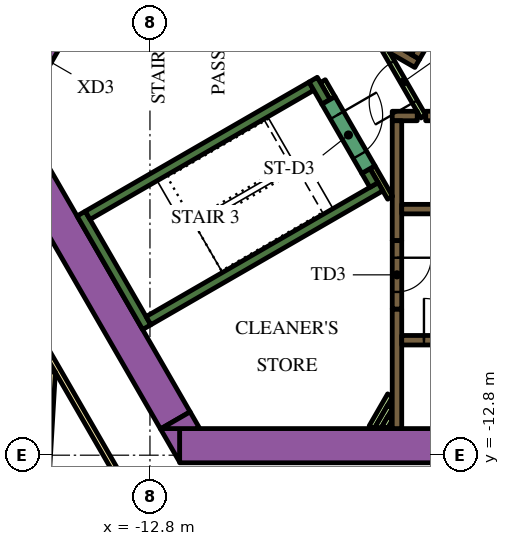
"""IFC4 building model, lengths in metres.
Left out: names, types, materials, properties, quantities, classifications, styles, units other than length and angle.
Written with IfcOpenShell. Run it as: python <this file> out.ifc"""

import sys

from ifc_helpers import new_model, si_unit, direction, frame, frame_2d, origin, place, context, subcontext, project, spatial, polyline, rectangle, outline, extrude, element, fill, save


model = new_model("IFC4")
c1 = context("Model", 3, precision=1e-05, world=origin(), true_north=direction((0.0, 1.0)))
c2 = subcontext(c1, "Body", "Model", "MODEL_VIEW")
j1 = project(units=[si_unit("LENGTHUNIT", "METRE"), si_unit("PLANEANGLEUNIT", "RADIAN")], contexts=[c1])
p1 = place(None, origin())
s1 = spatial("IfcSite", under=j1, at=p1, CompositionType="ELEMENT")
p2 = place(p1, origin())
s2 = spatial("IfcBuilding", under=s1, at=p2, CompositionType="ELEMENT")
p3 = place(p2, frame((0.0, 0.0, 111.0)))
s3 = spatial("IfcBuildingStorey", under=s2, at=p3, CompositionType="ELEMENT", Elevation=111.0)
p4 = place(p3, frame((-12.019, -12.55, 0.0), z_axis=(0.0, 0.0, 1.0), x_axis=(1.0, 0.0, 0.0)))
e1 = element("IfcWall", 1, at=p4, inside=s3, PredefinedType="SOLIDWALL", context=c2, shape_type="SweptSolid", body=[
    extrude(rectangle(XDim=21.63, YDim=0.9, at=frame_2d((10.815, 0.0))), origin(), (0.0, 0.0, 1.0), 3.9),
])
p5 = place(p3, origin())
e2 = element("IfcWall", 2, at=p5, inside=s3, PredefinedType="SOLIDWALL", context=c2, shape_type="SweptSolid", body=[
    extrude(outline(polyline([(-12.529, -12.1), (-12.021, -12.1), (-12.021, -12.98), (-12.529, -12.1)])), origin(), (0.0, 0.0, 1.0), 3.9),
])
p6 = place(p3, frame((-12.134, -11.883, 0.0), z_axis=(0.0, 0.0, 1.0), x_axis=(-0.500005339912, 0.866022320763, 0.0)))
e3 = element("IfcWall", 3, at=p6, inside=s3, PredefinedType="SOLIDWALL", context=c2, shape_type="SweptSolid", body=[
    extrude(rectangle(XDim=9.488, YDim=0.9, at=frame_2d((4.744, 0.0))), origin(), (0.0, 0.0, 1.0), 3.9),
])
e4 = element("IfcWall", 4, at=p5, inside=s3, PredefinedType="SOLIDWALL", context=c2, shape_type="SweptSolid", body=[
    extrude(outline(polyline([(-11.489, -12.1), (-12.505, -12.1), (-11.743, -11.66), (-11.489, -12.1)])), origin(), (0.0, 0.0, 1.0), 3.9),
])
p7 = place(p3, frame((-12.885, -9.431, 0.0), z_axis=(0.0, 0.0, 1.0), x_axis=(-0.500020560727, 0.866013532718, 0.0)))
e5 = element("IfcWall", 5, at=p7, inside=s3, PredefinedType="SOLIDWALL", context=c2, shape_type="SweptSolid", body=[
    extrude(rectangle(XDim=3.45, YDim=0.25, at=frame_2d((1.725, 0.0))), origin(), (0.0, 0.0, 1.0), 3.9),
])
p8 = place(p3, frame((-14.44, -6.49, 0.0), z_axis=(0.0, 0.0, 1.0), x_axis=(0.866022966069, 0.500004222222, 0.0)))
e6 = element("IfcWall", 6, at=p8, inside=s3, PredefinedType="SOLIDWALL", context=c2, shape_type="SweptSolid", body=[
    extrude(rectangle(XDim=6.8, YDim=0.25, at=frame_2d((3.4, 0.0))), origin(), (0.0, 0.0, 1.0), 3.9),
])
p9 = place(p3, frame((-8.168, -3.503, 0.0), z_axis=(0.0, 0.0, 1.0), x_axis=(-0.499952099219, 0.866053057547, 0.0)))
e7 = element("IfcWall", 7, at=p9, inside=s3, PredefinedType="SOLIDWALL", context=c2, shape_type="SweptSolid", body=[
    extrude(rectangle(XDim=0.675, YDim=0.25, at=frame_2d((0.337, 0.0))), origin(), (0.0, 0.0, 1.0), 3.9),
])
p10 = place(p3, frame((-12.84, -9.261, 0.0), z_axis=(0.0, 0.0, 1.0), x_axis=(0.866016039709, 0.500016218704, 0.0)))
e8 = element("IfcWall", 8, at=p10, inside=s3, PredefinedType="SOLIDWALL", context=c2, shape_type="SweptSolid", body=[
    extrude(rectangle(XDim=7.05, YDim=0.25, at=frame_2d((3.525, 0.0))), origin(), (0.0, 0.0, 1.0), 3.9),
])
p11 = place(p3, frame((-6.905, -5.69, 0.0), z_axis=(0.0, 0.0, 1.0), x_axis=(-0.500402024738, 0.865793170242, 0.0)))
e9 = element("IfcWall", 9, at=p11, inside=s3, PredefinedType="SOLIDWALL", context=c2, shape_type="SweptSolid", body=[
    extrude(rectangle(XDim=0.425, YDim=0.25, at=frame_2d((0.212, 0.0))), origin(), (0.0, 0.0, 1.0), 3.9),
])
p12 = place(p3, frame((-6.3, -12.1, 0.0), z_axis=(0.0, 0.0, 1.0), x_axis=(0.0, 1.0, 0.0)))
e10 = element("IfcWall", 10, at=p12, inside=s3, PredefinedType="SOLIDWALL", context=c2, shape_type="SweptSolid", body=[
    extrude(rectangle(XDim=3.146, YDim=0.25, at=frame_2d((1.573, 0.0))), origin(), (0.0, 0.0, 1.0), 3.9),
])
p13 = place(p3, frame((-5.545, -3.875, 0.0), z_axis=(0.0, 0.0, 1.0), x_axis=(1.0, 0.0, 0.0)))
e11 = element("IfcWall", 11, at=p13, inside=s3, PredefinedType="SOLIDWALL", context=c2, shape_type="SweptSolid", body=[
    extrude(rectangle(XDim=11.97, YDim=0.25, at=frame_2d((5.985, 0.0))), origin(), (0.0, 0.0, 1.0), 3.9),
])
p14 = place(p3, frame((-6.425, -3.875, 0.0), z_axis=(0.0, 0.0, 1.0), x_axis=(1.0, 0.0, 0.0)))
e12 = element("IfcWall", 12, at=p14, inside=s3, PredefinedType="SOLIDWALL", context=c2, shape_type="SweptSolid", body=[
    extrude(rectangle(XDim=0.658, YDim=0.25, at=frame_2d((0.329, 0.0))), origin(), (0.0, 0.0, 1.0), 3.9),
])
p15 = place(p3, frame((-6.3, -4.0, 0.0), z_axis=(0.0, 0.0, 1.0), x_axis=(0.0, -1.0, 0.0)))
e13 = element("IfcWall", 13, at=p15, inside=s3, PredefinedType="SOLIDWALL", context=c2, shape_type="SweptSolid", body=[
    extrude(rectangle(XDim=3.154, YDim=0.25, at=frame_2d((1.577, 0.0))), origin(), (0.0, 0.0, 1.0), 3.9),
])
e14 = element("IfcWall", 14, at=p5, inside=s3, PredefinedType="SOLIDWALL", context=c2, shape_type="SweptSolid", body=[
    extrude(outline(polyline([(-5.922, -2.257), (-5.922, -2.257), (-5.705, -2.382), (-5.83, -2.598), (-6.483, -2.221), (-6.591, -2.033), (-6.591, -2.033), (-6.7, -2.096), (-7.952, -1.373), (-7.827, -1.156), (-5.922, -2.257)])), origin(), (0.0, 0.0, 1.0), 3.9),
])
p16 = place(p3, frame((-6.968, -12.068, 0.0), z_axis=(0.0, 0.0, 1.0), x_axis=(0.49998975084, 0.866031321059, 0.0)))
e15 = element("IfcWall", 15, at=p16, inside=s3, PredefinedType="PARTITIONING", context=c2, shape_type="SweptSolid", body=[
    extrude(rectangle(XDim=0.975, YDim=0.15, at=frame_2d((0.488, 0.0))), origin(), (0.0, 0.0, 1.0), 2.75),
])
p17 = place(p3, frame((-6.794, -12.068, 0.0), z_axis=(0.0, 0.0, 1.0), x_axis=(0.49985693963, 0.866107983974, 0.0)))
e16 = element("IfcWall", 16, at=p17, inside=s3, PredefinedType="PARTITIONING", context=c2, shape_type="SweptSolid", body=[
    extrude(rectangle(XDim=0.629, YDim=0.15, at=frame_2d((0.314, 0.0))), origin(), (0.0, 0.0, 1.0), 2.75),
])
p18 = place(p3, frame((-6.621, -12.068, 0.0), z_axis=(0.0, 0.0, 1.0), x_axis=(0.500046963369, 0.865998287773, 0.0)))
e17 = element("IfcWall", 17, at=p18, inside=s3, PredefinedType="PARTITIONING", context=c2, shape_type="SweptSolid", body=[
    extrude(rectangle(XDim=0.282, YDim=0.15, at=frame_2d((0.141, 0.0))), origin(), (0.0, 0.0, 1.0), 2.75),
])
p19 = place(p3, frame((-6.48, -6.027, 0.0), z_axis=(0.0, 0.0, 1.0), x_axis=(-0.499927229454, 0.866067413802, 0.0)))
e18 = element("IfcWall", 18, at=p19, inside=s3, PredefinedType="PARTITIONING", context=c2, shape_type="SweptSolid", body=[
    extrude(rectangle(XDim=0.929, YDim=0.15, at=frame_2d((0.464, 0.0))), origin(), (0.0, 0.0, 1.0), 3.9),
])
p20 = place(p3, frame((-8.252, -2.958, 0.0), z_axis=(0.0, 0.0, 1.0), x_axis=(0.500174715838, -0.865924508047, 0.0)))
e19 = element("IfcWall", 19, at=p20, inside=s3, PredefinedType="PARTITIONING", context=c2, shape_type="SweptSolid", body=[
    extrude(rectangle(XDim=0.514, YDim=0.15, at=frame_2d((0.257, 0.0))), origin(), (0.0, 0.0, 1.0), 2.75),
])
p21 = place(p3, frame((-6.175, -9.775, 0.0), z_axis=(0.0, 0.0, 1.0), x_axis=(1.0, 0.0, 0.0)))
e20 = element("IfcWall", 20, at=p21, inside=s3, PredefinedType="SOLIDWALL", context=c2, shape_type="SweptSolid", body=[
    extrude(rectangle(XDim=12.35, YDim=0.25, at=frame_2d((6.175, 0.0))), origin(), (0.0, 0.0, 1.0), 3.9),
])
p22 = place(p21, frame((0.585, 0.0, 0.0)))
e21 = element("IfcOpeningElement", 21, at=p22, cuts=e20, PredefinedType="OPENING", context=c2, shape_type="SweptSolid", body=[
    extrude(rectangle(XDim=1.1, YDim=2.1, at=frame_2d((0.55, 1.05))), frame((0.0, 0.135, 0.0), z_axis=(0.0, -1.0, 0.0), x_axis=(1.0, 0.0, 0.0)), (0.0, 0.0, 1.0), 0.27),
])
p23 = place(p21, frame((3.105, 0.0, 0.0)))
e22 = element("IfcOpeningElement", 22, at=p23, cuts=e20, PredefinedType="OPENING", context=c2, shape_type="SweptSolid", body=[
    extrude(rectangle(XDim=1.1, YDim=2.1, at=frame_2d((0.55, 1.05))), frame((0.0, 0.135, 0.0), z_axis=(0.0, -1.0, 0.0), x_axis=(1.0, 0.0, 0.0)), (0.0, 0.0, 1.0), 0.27),
])
p24 = place(p21, frame((5.625, 0.0, 0.0)))
e23 = element("IfcOpeningElement", 23, at=p24, cuts=e20, PredefinedType="OPENING", context=c2, shape_type="SweptSolid", body=[
    extrude(rectangle(XDim=1.1, YDim=2.1, at=frame_2d((0.55, 1.05))), frame((0.0, 0.135, 0.0), z_axis=(0.0, -1.0, 0.0), x_axis=(1.0, 0.0, 0.0)), (0.0, 0.0, 1.0), 0.27),
])
p25 = place(p21, frame((8.145, 0.0, 0.0)))
e24 = element("IfcOpeningElement", 24, at=p25, cuts=e20, PredefinedType="OPENING", context=c2, shape_type="SweptSolid", body=[
    extrude(rectangle(XDim=1.1, YDim=2.1, at=frame_2d((0.55, 1.05))), frame((0.0, 0.135, 0.0), z_axis=(0.0, -1.0, 0.0), x_axis=(1.0, 0.0, 0.0)), (0.0, 0.0, 1.0), 0.27),
])
p26 = place(p21, frame((10.665, 0.0, 0.0)))
e25 = element("IfcOpeningElement", 25, at=p26, cuts=e20, PredefinedType="OPENING", context=c2, shape_type="SweptSolid", body=[
    extrude(rectangle(XDim=1.1, YDim=2.1, at=frame_2d((0.55, 1.05))), frame((0.0, 0.135, 0.0), z_axis=(0.0, -1.0, 0.0), x_axis=(1.0, 0.0, 0.0)), (0.0, 0.0, 1.0), 0.27),
])
p27 = place(p3, frame((-6.175, -6.325, 0.0), z_axis=(0.0, 0.0, 1.0), x_axis=(1.0, 0.0, 0.0)))
e26 = element("IfcWall", 26, at=p27, inside=s3, PredefinedType="SOLIDWALL", context=c2, shape_type="SweptSolid", body=[
    extrude(rectangle(XDim=12.35, YDim=0.25, at=frame_2d((6.175, 0.0))), origin(), (0.0, 0.0, 1.0), 3.9),
])
p28 = place(p27, frame((3.205, 0.0, 0.0)))
e27 = element("IfcOpeningElement", 27, at=p28, cuts=e26, PredefinedType="OPENING", context=c2, shape_type="SweptSolid", body=[
    extrude(rectangle(XDim=0.9, YDim=2.1, at=frame_2d((0.45, 1.05))), frame((0.0, 0.135, 0.0), z_axis=(0.0, -1.0, 0.0), x_axis=(1.0, 0.0, 0.0)), (0.0, 0.0, 1.0), 0.27),
])
p29 = place(p27, frame((8.145, 0.0, 0.0)))
e28 = element("IfcOpeningElement", 28, at=p29, cuts=e26, PredefinedType="OPENING", context=c2, shape_type="SweptSolid", body=[
    extrude(rectangle(XDim=1.1, YDim=2.1, at=frame_2d((0.55, 1.05))), frame((0.0, 0.135, 0.0), z_axis=(0.0, -1.0, 0.0), x_axis=(1.0, 0.0, 0.0)), (0.0, 0.0, 1.0), 0.27),
])
p30 = place(p27, frame((10.665, 0.0, 0.0)))
e29 = element("IfcOpeningElement", 29, at=p30, cuts=e26, PredefinedType="OPENING", context=c2, shape_type="SweptSolid", body=[
    extrude(rectangle(XDim=1.1, YDim=2.1, at=frame_2d((0.55, 1.05))), frame((0.0, 0.135, 0.0), z_axis=(0.0, -1.0, 0.0), x_axis=(1.0, 0.0, 0.0)), (0.0, 0.0, 1.0), 0.27),
])
p31 = place(p3, frame((-0.898, 6.194, 0.0), z_axis=(0.0, 0.0, 1.0), x_axis=(-0.499996202215, -0.866027596426, 0.0)))
e30 = element("IfcWall", 30, at=p31, inside=s3, PredefinedType="SOLIDWALL", context=c2, shape_type="SweptSolid", body=[
    extrude(rectangle(XDim=9.83, YDim=0.25, at=frame_2d((4.915, 0.0))), origin(), (0.0, 0.0, 1.0), 3.9),
])
p32 = place(p31, frame((0.585, 0.0, 0.0)))
e31 = element("IfcOpeningElement", 31, at=p32, cuts=e30, PredefinedType="OPENING", context=c2, shape_type="SweptSolid", body=[
    extrude(rectangle(XDim=1.1, YDim=2.1, at=frame_2d((0.55, 1.05))), frame((0.0, 0.135, 0.0), z_axis=(0.0, -1.0, 0.0), x_axis=(1.0, 0.0, 0.0)), (0.0, 0.0, 1.0), 0.27),
])
p33 = place(p31, frame((3.105, 0.0, 0.0)))
e32 = element("IfcOpeningElement", 32, at=p33, cuts=e30, PredefinedType="OPENING", context=c2, shape_type="SweptSolid", body=[
    extrude(rectangle(XDim=1.1, YDim=2.1, at=frame_2d((0.55, 1.05))), frame((0.0, 0.135, 0.0), z_axis=(0.0, -1.0, 0.0), x_axis=(1.0, 0.0, 0.0)), (0.0, 0.0, 1.0), 0.27),
])
p34 = place(p31, frame((5.625, 0.0, 0.0)))
e33 = element("IfcOpeningElement", 33, at=p34, cuts=e30, PredefinedType="OPENING", context=c2, shape_type="SweptSolid", body=[
    extrude(rectangle(XDim=1.1, YDim=2.1, at=frame_2d((0.55, 1.05))), frame((0.0, 0.135, 0.0), z_axis=(0.0, -1.0, 0.0), x_axis=(1.0, 0.0, 0.0)), (0.0, 0.0, 1.0), 0.27),
])
p35 = place(p31, frame((8.145, 0.0, 0.0)))
e34 = element("IfcOpeningElement", 34, at=p35, cuts=e30, PredefinedType="OPENING", context=c2, shape_type="SweptSolid", body=[
    extrude(rectangle(XDim=1.1, YDim=2.1, at=frame_2d((0.55, 1.05))), frame((0.0, 0.135, 0.0), z_axis=(0.0, -1.0, 0.0), x_axis=(1.0, 0.0, 0.0)), (0.0, 0.0, 1.0), 0.27),
])
p36 = place(p3, frame((-8.103, -3.466, 0.0), z_axis=(0.0, 0.0, 1.0), x_axis=(0.500078061341, -0.865980330357, 0.0)))
e35 = element("IfcWall", 35, at=p36, inside=s3, PredefinedType="SOLIDWALL", context=c2, shape_type="SweptSolid", body=[
    extrude(rectangle(XDim=2.1, YDim=0.4, at=frame_2d((1.05, 0.0))), origin(), (0.0, 0.0, 1.0), 3.9),
])
p37 = place(p36, frame((0.45, 0.0, 0.0)))
e36 = element("IfcOpeningElement", 36, at=p37, cuts=e35, PredefinedType="OPENING", context=c2, shape_type="SweptSolid", body=[
    extrude(rectangle(XDim=1.2, YDim=2.1, at=frame_2d((0.6, 1.05))), frame((0.0, 0.21, 0.0), z_axis=(0.0, -1.0, 0.0), x_axis=(1.0, 0.0, 0.0)), (0.0, 0.0, 1.0), 0.42),
])
p38 = place(p3, frame((-6.3, -7.154, 0.0), z_axis=(0.0, 0.0, 1.0), x_axis=(0.0, -1.0, 0.0)))
e37 = element("IfcWall", 37, at=p38, inside=s3, PredefinedType="SOLIDWALL", context=c2, shape_type="SweptSolid", body=[
    extrude(rectangle(XDim=1.8, YDim=0.25, at=frame_2d((0.9, 0.0))), origin(), (0.0, 0.0, 1.0), 3.9),
])
p39 = place(p38, frame((0.45, 0.0, 0.0)))
e38 = element("IfcOpeningElement", 38, at=p39, cuts=e37, PredefinedType="OPENING", context=c2, shape_type="SweptSolid", body=[
    extrude(rectangle(XDim=0.9, YDim=2.1, at=frame_2d((0.45, 1.05))), frame((0.0, 0.135, 0.0), z_axis=(0.0, -1.0, 0.0), x_axis=(1.0, 0.0, 0.0)), (0.0, 0.0, 1.0), 0.27),
])
p40 = place(p3, frame((-5.606, -3.89, 0.0), z_axis=(0.0, 0.0, 1.0), x_axis=(-0.500027713859, 0.866009402589, 0.0)))
e39 = element("IfcWall", 39, at=p40, inside=s3, PredefinedType="PARTITIONING", context=c2, shape_type="SweptSolid", body=[
    extrude(rectangle(XDim=2.1, YDim=0.15, at=frame_2d((1.05, 0.0))), origin(), (0.0, 0.0, 1.0), 2.75),
])
p41 = place(p40, frame((0.45, 0.0, 0.0)))
e40 = element("IfcOpeningElement", 40, at=p41, cuts=e39, PredefinedType="OPENING", context=c2, shape_type="SweptSolid", body=[
    extrude(rectangle(XDim=1.2, YDim=2.1, at=frame_2d((0.6, 1.05))), frame((0.0, 0.085, 0.0), z_axis=(0.0, -1.0, 0.0), x_axis=(1.0, 0.0, 0.0)), (0.0, 0.0, 1.0), 0.17),
])
p42 = place(p3, frame((-16.209, -2.976, 0.0), z_axis=(0.0, 0.0, 1.0), x_axis=(0.499954529098, 0.86605165483, 0.0)))
e41 = element("IfcWall", 41, at=p42, inside=s3, PredefinedType="SOLIDWALL", context=c2, shape_type="SweptSolid", body=[
    extrude(rectangle(XDim=1.7, YDim=0.9, at=frame_2d((0.85, 0.0))), origin(), (0.0, 0.0, 1.0), 3.9),
])
p43 = place(p42, frame((0.25, 0.0, 0.0)))
e42 = element("IfcOpeningElement", 42, at=p43, cuts=e41, PredefinedType="OPENING", context=c2, shape_type="SweptSolid", body=[
    extrude(rectangle(XDim=1.2, YDim=2.1, at=frame_2d((0.6, 1.05))), frame((0.0, 0.46, 0.0), z_axis=(0.0, -1.0, 0.0), x_axis=(1.0, 0.0, 0.0)), (0.0, 0.0, 1.0), 0.92),
])
p44 = place(p3, frame((-19.081, -3.9, 0.0), z_axis=(0.0, 0.0, 1.0), x_axis=(0.499998313975, 0.866026377209, 0.0)))
e43 = element("IfcWall", 43, at=p44, inside=s3, PredefinedType="PARTITIONING", context=c2, shape_type="SweptSolid", body=[
    extrude(rectangle(XDim=25.766, YDim=0.15, at=frame_2d((12.883, 0.0))), origin(), (0.0, 0.0, 1.0), 2.75),
])
p45 = place(p44, frame((19.306, 0.0, 0.0)))
e44 = element("IfcOpeningElement", 44, at=p45, cuts=e43, PredefinedType="OPENING", context=c2, shape_type="SweptSolid", body=[
    extrude(rectangle(XDim=1.0, YDim=2.1, at=frame_2d((0.5, 1.05))), frame((0.0, 0.085, 0.0), z_axis=(0.0, -1.0, 0.0), x_axis=(1.0, 0.0, 0.0)), (0.0, 0.0, 1.0), 0.17),
])
p46 = place(p44, frame((18.0, 0.0, 0.0)))
e45 = element("IfcOpeningElement", 45, at=p46, cuts=e43, PredefinedType="OPENING", context=c2, shape_type="SweptSolid", body=[
    extrude(rectangle(XDim=1.0, YDim=2.1, at=frame_2d((0.5, 1.05))), frame((0.0, 0.085, 0.0), z_axis=(0.0, -1.0, 0.0), x_axis=(1.0, 0.0, 0.0)), (0.0, 0.0, 1.0), 0.17),
])
p47 = place(p44, frame((6.838, 0.0, 0.0)))
e46 = element("IfcOpeningElement", 46, at=p47, cuts=e43, PredefinedType="OPENING", context=c2, shape_type="SweptSolid", body=[
    extrude(rectangle(XDim=1.0, YDim=2.1, at=frame_2d((0.5, 1.05))), frame((0.0, 0.085, 0.0), z_axis=(0.0, -1.0, 0.0), x_axis=(1.0, 0.0, 0.0)), (0.0, 0.0, 1.0), 0.17),
])
p48 = place(p44, frame((4.674, 0.0, 0.0)))
e47 = element("IfcOpeningElement", 47, at=p48, cuts=e43, PredefinedType="OPENING", context=c2, shape_type="SweptSolid", body=[
    extrude(rectangle(XDim=0.9, YDim=2.1, at=frame_2d((0.45, 1.05))), frame((0.0, 0.085, 0.0), z_axis=(0.0, -1.0, 0.0), x_axis=(1.0, 0.0, 0.0)), (0.0, 0.0, 1.0), 0.17),
])
p49 = place(p44, frame((0.18, 0.0, 0.0)))
e48 = element("IfcOpeningElement", 48, at=p49, cuts=e43, PredefinedType="OPENING", context=c2, shape_type="SweptSolid", body=[
    extrude(rectangle(XDim=1.0, YDim=2.1, at=frame_2d((0.5, 1.05))), frame((0.0, 0.085, 0.0), z_axis=(0.0, -1.0, 0.0), x_axis=(1.0, 0.0, 0.0)), (0.0, 0.0, 1.0), 0.17),
])
p50 = place(p3, frame((-12.918, -14.575, 0.0), z_axis=(0.0, 0.0, 1.0), x_axis=(-0.500009150678, 0.866020120573, 0.0)))
e49 = element("IfcWall", 49, at=p50, inside=s3, PredefinedType="PARTITIONING", context=c2, shape_type="SweptSolid", body=[
    extrude(rectangle(XDim=5.258, YDim=0.15, at=frame_2d((2.629, 0.0))), origin(), (0.0, 0.0, 1.0), 2.75),
])
p51 = place(p3, frame((-15.999, -21.467, 0.0), z_axis=(0.0, 0.0, 1.0), x_axis=(0.058411453297, 0.998292593443, 0.0)))
e50 = element("IfcWall", 50, at=p51, inside=s3, PredefinedType="PARTITIONING", context=c2, shape_type="SweptSolid", body=[
    extrude(rectangle(XDim=10.875, YDim=0.15, at=frame_2d((5.438, 0.0))), origin(), (0.0, 0.0, 1.0), 2.75),
])
p52 = place(p22, origin())
e51 = element("IfcDoor", 51, at=p52, inside=s3, OperationType="DOUBLE_DOOR_SLIDING", PredefinedType="DOOR", context=c2, shape_type="SweptSolid", body=[
    extrude(rectangle(XDim=1.1, YDim=2.1, at=frame_2d((0.55, 1.05))), frame((0.0, 0.025, 0.0), z_axis=(0.0, -1.0, 0.0), x_axis=(1.0, 0.0, 0.0)), (0.0, 0.0, 1.0), 0.05),
])
fill(e21, e51)
p53 = place(p37, origin())
e52 = element("IfcDoor", 52, at=p53, inside=s3, OperationType="SINGLE_SWING_LEFT", PredefinedType="DOOR", context=c2, shape_type="SweptSolid", body=[
    extrude(rectangle(XDim=1.2, YDim=2.1, at=frame_2d((0.6, 1.05))), frame((0.0, 0.025, 0.0), z_axis=(0.0, -1.0, 0.0), x_axis=(1.0, 0.0, 0.0)), (0.0, 0.0, 1.0), 0.05),
])
fill(e36, e52)
p54 = place(p39, origin())
e53 = element("IfcDoor", 53, at=p54, inside=s3, OperationType="SINGLE_SWING_LEFT", PredefinedType="DOOR", context=c2, shape_type="SweptSolid", body=[
    extrude(rectangle(XDim=0.9, YDim=2.1, at=frame_2d((0.45, 1.05))), frame((0.0, 0.025, 0.0), z_axis=(0.0, -1.0, 0.0), x_axis=(1.0, 0.0, 0.0)), (0.0, 0.0, 1.0), 0.05),
])
fill(e38, e53)
p55 = place(p41, origin())
e54 = element("IfcDoor", 54, at=p55, inside=s3, OperationType="SINGLE_SWING_LEFT", PredefinedType="DOOR", context=c2, shape_type="SweptSolid", body=[
    extrude(rectangle(XDim=1.2, YDim=2.1, at=frame_2d((0.6, 1.05))), frame((0.0, 0.025, 0.0), z_axis=(0.0, -1.0, 0.0), x_axis=(1.0, 0.0, 0.0)), (0.0, 0.0, 1.0), 0.05),
])
fill(e40, e54)
save(model, sys.argv[1])
